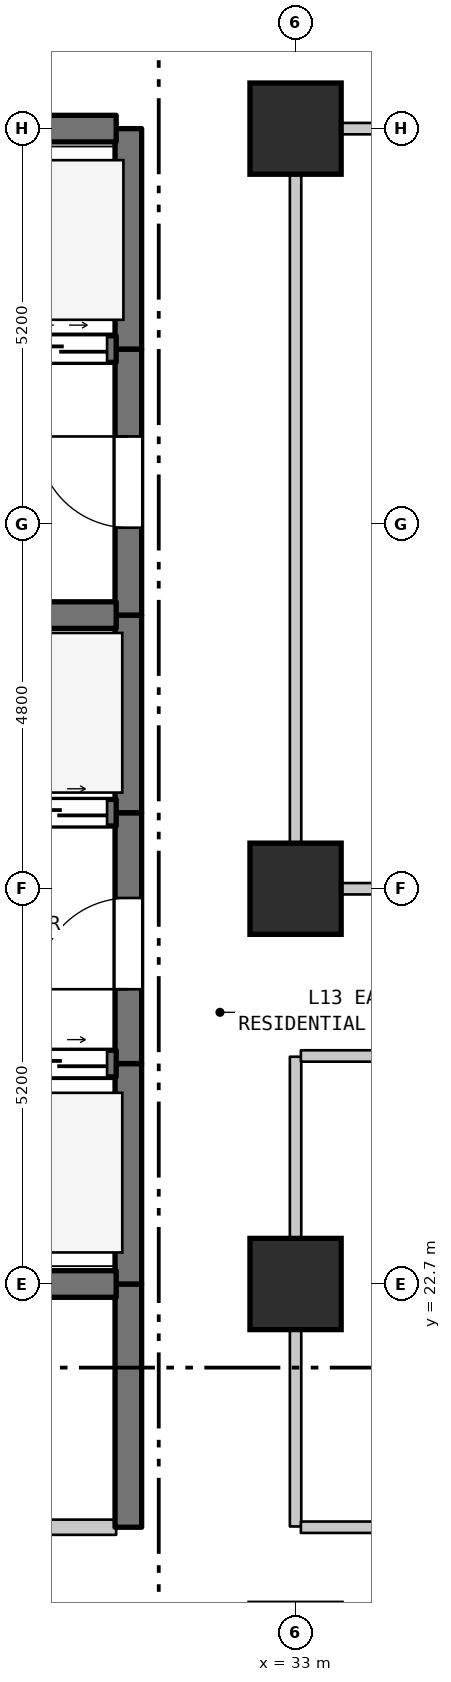
"""IFC4 building model, lengths in metres.
Left out: names, types, materials, properties, quantities, classifications, styles, units other than length and angle.
Written with IfcOpenShell. Run it as: python <this file> out.ifc"""

import sys

from ifc_helpers import new_model, si_unit, direction, frame, frame_2d, origin, origin_2d, place, context, subcontext, project, spatial, rectangle, extrude, element, fill, save


model = new_model("IFC4")
c1 = context("Model", 3, precision=1e-05, world=origin(), true_north=direction((0.0, 1.0)))
c2 = subcontext(c1, "Body", "Model", "MODEL_VIEW")
j1 = project(units=[si_unit("LENGTHUNIT", "METRE"), si_unit("PLANEANGLEUNIT", "RADIAN")], contexts=[c1])
p1 = place(None, origin())
s1 = spatial("IfcSite", under=j1, at=p1, CompositionType="ELEMENT")
p2 = place(p1, origin())
s2 = spatial("IfcBuilding", under=s1, at=p2, CompositionType="ELEMENT")
p3 = place(p2, frame((0.0, 0.0, 57.3)))
s3 = spatial("IfcBuildingStorey", under=s2, at=p3, CompositionType="ELEMENT", Elevation=57.3)
for number, where, z_axis, x_axis in (
    (1, (33.0, 22.7, 0.0), (0.0, 0.0, 1.0), (1.0, 0.0, 0.0)),
    (2, (33.0, 27.9, 0.0), (0.0, 0.0, 1.0), (1.0, 0.0, 0.0)),
    (3, (33.0, 37.9, 0.0), (0.0, 0.0, 1.0), (1.0, 0.0, 0.0)),
):
    element("IfcColumn", number, at=place(p3, frame(where, z_axis=z_axis, x_axis=x_axis)), inside=s3, PredefinedType="COLUMN", context=c2, shape_type="SweptSolid", body=[
        extrude(rectangle(XDim=1.2, YDim=1.2, at=origin_2d()), origin(), (0.0, 0.0, 1.0), 3.7),
    ])
p4 = place(p3, frame((30.8, 19.5, 0.0), z_axis=(0.0, 0.0, 1.0), x_axis=(0.0, 1.0, 0.0)))
e4 = element("IfcWall", 4, at=p4, inside=s3, PredefinedType="SHEAR", context=c2, shape_type="SweptSolid", body=[
    extrude(rectangle(XDim=3.2, YDim=0.35, at=frame_2d((1.6, 0.0))), origin(), (0.0, 0.0, 1.0), 3.28),
])
p5 = place(p3, frame((30.8, 22.7, 0.0), z_axis=(0.0, 0.0, 1.0), x_axis=(0.0, 1.0, 0.0)))
e5 = element("IfcWall", 5, at=p5, inside=s3, PredefinedType="SHEAR", context=c2, shape_type="SweptSolid", body=[
    extrude(rectangle(XDim=2.9, YDim=0.35, at=frame_2d((1.45, 0.0))), origin(), (0.0, 0.0, 1.0), 3.28),
])
p6 = place(p3, frame((30.8, 25.6, 0.0), z_axis=(0.0, 0.0, 1.0), x_axis=(0.0, 1.0, 0.0)))
e6 = element("IfcWall", 6, at=p6, inside=s3, PredefinedType="SHEAR", context=c2, shape_type="SweptSolid", body=[
    extrude(rectangle(XDim=3.3, YDim=0.35, at=frame_2d((1.65, 0.0))), origin(), (0.0, 0.0, 1.0), 3.28),
])
p7 = place(p6, frame((0.978, 0.0, 0.0)))
e7 = element("IfcOpeningElement", 7, at=p7, cuts=e6, PredefinedType="OPENING", context=c2, shape_type="SweptSolid", body=[
    extrude(rectangle(XDim=1.2, YDim=2.2, at=frame_2d((0.6, 1.1))), frame((0.0, 0.185, 0.0), z_axis=(0.0, -1.0, 0.0), x_axis=(1.0, 0.0, 0.0)), (0.0, 0.0, 1.0), 0.37),
])
p8 = place(p3, frame((30.8, 28.9, 0.0), z_axis=(0.0, 0.0, 1.0), x_axis=(0.0, 1.0, 0.0)))
e8 = element("IfcWall", 8, at=p8, inside=s3, PredefinedType="SHEAR", context=c2, shape_type="SweptSolid", body=[
    extrude(rectangle(XDim=2.6, YDim=0.35, at=frame_2d((1.3, 0.0))), origin(), (0.0, 0.0, 1.0), 3.28),
])
p9 = place(p3, frame((30.8, 31.5, 0.0), z_axis=(0.0, 0.0, 1.0), x_axis=(0.0, 1.0, 0.0)))
e9 = element("IfcWall", 9, at=p9, inside=s3, PredefinedType="SHEAR", context=c2, shape_type="SweptSolid", body=[
    extrude(rectangle(XDim=3.5, YDim=0.35, at=frame_2d((1.75, 0.0))), origin(), (0.0, 0.0, 1.0), 3.28),
])
p10 = place(p9, frame((1.15, 0.0, 0.0)))
e10 = element("IfcOpeningElement", 10, at=p10, cuts=e9, PredefinedType="OPENING", context=c2, shape_type="SweptSolid", body=[
    extrude(rectangle(XDim=1.2, YDim=2.2, at=frame_2d((0.6, 1.1))), frame((0.0, 0.185, 0.0), z_axis=(0.0, -1.0, 0.0), x_axis=(1.0, 0.0, 0.0)), (0.0, 0.0, 1.0), 0.37),
])
p11 = place(p3, frame((30.8, 35.0, 0.0), z_axis=(0.0, 0.0, 1.0), x_axis=(0.0, 1.0, 0.0)))
e11 = element("IfcWall", 11, at=p11, inside=s3, PredefinedType="SHEAR", context=c2, shape_type="SweptSolid", body=[
    extrude(rectangle(XDim=2.9, YDim=0.35, at=frame_2d((1.45, 0.0))), origin(), (0.0, 0.0, 1.0), 3.28),
])
p12 = place(p3, frame((33.0, 19.51, 0.0), z_axis=(0.0, 0.0, 1.0), x_axis=(0.0, 1.0, 0.0)))
e12 = element("IfcWall", 12, at=p12, inside=s3, PredefinedType="STANDARD", context=c2, shape_type="SweptSolid", body=[
    extrude(rectangle(XDim=6.18, YDim=0.15, at=frame_2d((3.09, 0.0))), origin(), (0.0, 0.0, 1.0), 2.78),
])
p13 = place(p3, frame((33.0, 27.91, 0.0), z_axis=(0.0, 0.0, 1.0), x_axis=(0.0, 1.0, 0.0)))
e13 = element("IfcWall", 13, at=p13, inside=s3, PredefinedType="STANDARD", context=c2, shape_type="SweptSolid", body=[
    extrude(rectangle(XDim=9.98, YDim=0.15, at=frame_2d((4.99, 0.0))), origin(), (0.0, 0.0, 1.0), 2.78),
])
p14 = place(p3, frame((25.985, 19.5, 0.0), z_axis=(0.0, 0.0, 1.0), x_axis=(1.0, 0.0, 0.0)))
e14 = element("IfcWall", 14, at=p14, inside=s3, PredefinedType="STANDARD", context=c2, shape_type="SweptSolid", body=[
    extrude(rectangle(XDim=4.655, YDim=0.2, at=frame_2d((2.327, 0.0))), origin(), (0.0, 0.0, 1.0), 3.28),
])
p15 = place(p14, frame((1.845, 0.0, 0.0)))
e15 = element("IfcOpeningElement", 15, at=p15, cuts=e14, PredefinedType="OPENING", context=c2, shape_type="SweptSolid", body=[
    extrude(rectangle(XDim=0.9, YDim=2.15, at=frame_2d((0.45, 1.075))), frame((0.0, 0.11, 0.0), z_axis=(0.0, -1.0, 0.0), x_axis=(1.0, 0.0, 0.0)), (0.0, 0.0, 1.0), 0.22),
])
p16 = place(p3, frame((33.07, 19.5, 0.0), z_axis=(0.0, 0.0, 1.0), x_axis=(1.0, 0.0, 0.0)))
e16 = element("IfcWall", 16, at=p16, inside=s3, PredefinedType="STANDARD", context=c2, shape_type="SweptSolid", body=[
    extrude(rectangle(XDim=33.27, YDim=0.15, at=frame_2d((16.635, 0.0))), origin(), (0.0, 0.0, 1.0), 3.28),
])
p17 = place(p16, frame((16.065, 0.0, 0.0)))
e17 = element("IfcOpeningElement", 17, at=p17, cuts=e16, PredefinedType="OPENING", context=c2, shape_type="SweptSolid", body=[
    extrude(rectangle(XDim=1.0, YDim=2.15, at=frame_2d((0.5, 1.075))), frame((0.0, 0.085, 0.0), z_axis=(0.0, -1.0, 0.0), x_axis=(1.0, 0.0, 0.0)), (0.0, 0.0, 1.0), 0.17),
])
p18 = place(p3, frame((27.46, 22.7, 0.0), z_axis=(0.0, 0.0, 1.0), x_axis=(1.0, 0.0, 0.0)))
e18 = element("IfcWall", 18, at=p18, inside=s3, PredefinedType="SHEAR", context=c2, shape_type="SweptSolid", body=[
    extrude(rectangle(XDim=3.18, YDim=0.35, at=frame_2d((1.59, 0.0))), origin(), (0.0, 0.0, 1.0), 3.28),
])
p19 = place(p3, frame((27.46, 25.6, 0.0), z_axis=(0.0, 0.0, 1.0), x_axis=(1.0, 0.0, 0.0)))
e19 = element("IfcWall", 19, at=p19, inside=s3, PredefinedType="SHEAR", context=c2, shape_type="SweptSolid", body=[
    extrude(rectangle(XDim=3.18, YDim=0.35, at=frame_2d((1.59, 0.0))), origin(), (0.0, 0.0, 1.0), 3.28),
])
p20 = place(p19, frame((0.12, 0.0, 0.0)))
e20 = element("IfcOpeningElement", 20, at=p20, cuts=e19, PredefinedType="OPENING", context=c2, shape_type="SweptSolid", body=[
    extrude(rectangle(XDim=1.25, YDim=2.2, at=frame_2d((0.625, 1.1))), frame((0.0, 0.185, 0.0), z_axis=(0.0, -1.0, 0.0), x_axis=(1.0, 0.0, 0.0)), (0.0, 0.0, 1.0), 0.37),
])
p21 = place(p19, frame((1.81, 0.0, 0.0)))
e21 = element("IfcOpeningElement", 21, at=p21, cuts=e19, PredefinedType="OPENING", context=c2, shape_type="SweptSolid", body=[
    extrude(rectangle(XDim=1.25, YDim=2.2, at=frame_2d((0.625, 1.1))), frame((0.0, 0.185, 0.0), z_axis=(0.0, -1.0, 0.0), x_axis=(1.0, 0.0, 0.0)), (0.0, 0.0, 1.0), 0.37),
])
p22 = place(p3, frame((33.07, 25.7, 0.0), z_axis=(0.0, 0.0, 1.0), x_axis=(1.0, 0.0, 0.0)))
e22 = element("IfcWall", 22, at=p22, inside=s3, PredefinedType="STANDARD", context=c2, shape_type="SweptSolid", body=[
    extrude(rectangle(XDim=30.87, YDim=0.15, at=frame_2d((15.435, 0.0))), origin(), (0.0, 0.0, 1.0), 3.28),
])
p23 = place(p3, frame((33.07, 27.9, 0.0), z_axis=(0.0, 0.0, 1.0), x_axis=(1.0, 0.0, 0.0)))
e23 = element("IfcWall", 23, at=p23, inside=s3, PredefinedType="STANDARD", context=c2, shape_type="SweptSolid", body=[
    extrude(rectangle(XDim=30.87, YDim=0.15, at=frame_2d((15.435, 0.0))), origin(), (0.0, 0.0, 1.0), 2.78),
])
p24 = place(p23, frame((14.935, 0.0, 0.0)))
e24 = element("IfcOpeningElement", 24, at=p24, cuts=e23, PredefinedType="OPENING", context=c2, shape_type="SweptSolid", body=[
    extrude(rectangle(XDim=1.0, YDim=2.15, at=frame_2d((0.5, 1.075))), frame((0.0, 0.085, 0.0), z_axis=(0.0, -1.0, 0.0), x_axis=(1.0, 0.0, 0.0)), (0.0, 0.0, 1.0), 0.17),
])
p25 = place(p3, frame((27.46, 28.9, 0.0), z_axis=(0.0, 0.0, 1.0), x_axis=(1.0, 0.0, 0.0)))
e25 = element("IfcWall", 25, at=p25, inside=s3, PredefinedType="SHEAR", context=c2, shape_type="SweptSolid", body=[
    extrude(rectangle(XDim=3.18, YDim=0.35, at=frame_2d((1.59, 0.0))), origin(), (0.0, 0.0, 1.0), 3.28),
])
p26 = place(p25, frame((0.12, 0.0, 0.0)))
e26 = element("IfcOpeningElement", 26, at=p26, cuts=e25, PredefinedType="OPENING", context=c2, shape_type="SweptSolid", body=[
    extrude(rectangle(XDim=1.25, YDim=2.2, at=frame_2d((0.625, 1.1))), frame((0.0, 0.185, 0.0), z_axis=(0.0, -1.0, 0.0), x_axis=(1.0, 0.0, 0.0)), (0.0, 0.0, 1.0), 0.37),
])
p27 = place(p25, frame((1.81, 0.0, 0.0)))
e27 = element("IfcOpeningElement", 27, at=p27, cuts=e25, PredefinedType="OPENING", context=c2, shape_type="SweptSolid", body=[
    extrude(rectangle(XDim=1.25, YDim=2.2, at=frame_2d((0.625, 1.1))), frame((0.0, 0.185, 0.0), z_axis=(0.0, -1.0, 0.0), x_axis=(1.0, 0.0, 0.0)), (0.0, 0.0, 1.0), 0.37),
])
p28 = place(p3, frame((27.46, 31.5, 0.0), z_axis=(0.0, 0.0, 1.0), x_axis=(1.0, 0.0, 0.0)))
e28 = element("IfcWall", 28, at=p28, inside=s3, PredefinedType="SHEAR", context=c2, shape_type="SweptSolid", body=[
    extrude(rectangle(XDim=3.18, YDim=0.35, at=frame_2d((1.59, 0.0))), origin(), (0.0, 0.0, 1.0), 3.28),
])
p29 = place(p3, frame((19.16, 35.0, 0.0), z_axis=(0.0, 0.0, 1.0), x_axis=(1.0, 0.0, 0.0)))
e29 = element("IfcWall", 29, at=p29, inside=s3, PredefinedType="SHEAR", context=c2, shape_type="SweptSolid", body=[
    extrude(rectangle(XDim=11.48, YDim=0.35, at=frame_2d((5.74, 0.0))), origin(), (0.0, 0.0, 1.0), 3.28),
])
p30 = place(p29, frame((0.365, 0.0, 0.0)))
e30 = element("IfcOpeningElement", 30, at=p30, cuts=e29, PredefinedType="OPENING", context=c2, shape_type="SweptSolid", body=[
    extrude(rectangle(XDim=1.35, YDim=2.2, at=frame_2d((0.675, 1.1))), frame((0.0, 0.185, 0.0), z_axis=(0.0, -1.0, 0.0), x_axis=(1.0, 0.0, 0.0)), (0.0, 0.0, 1.0), 0.37),
])
p31 = place(p29, frame((2.765, 0.0, 0.0)))
e31 = element("IfcOpeningElement", 31, at=p31, cuts=e29, PredefinedType="OPENING", context=c2, shape_type="SweptSolid", body=[
    extrude(rectangle(XDim=1.35, YDim=2.2, at=frame_2d((0.675, 1.1))), frame((0.0, 0.185, 0.0), z_axis=(0.0, -1.0, 0.0), x_axis=(1.0, 0.0, 0.0)), (0.0, 0.0, 1.0), 0.37),
])
p32 = place(p29, frame((4.915, 0.0, 0.0)))
e32 = element("IfcOpeningElement", 32, at=p32, cuts=e29, PredefinedType="OPENING", context=c2, shape_type="SweptSolid", body=[
    extrude(rectangle(XDim=1.2, YDim=2.2, at=frame_2d((0.6, 1.1))), frame((0.0, 0.185, 0.0), z_axis=(0.0, -1.0, 0.0), x_axis=(1.0, 0.0, 0.0)), (0.0, 0.0, 1.0), 0.37),
])
p33 = place(p29, frame((6.665, 0.0, 0.0)))
e33 = element("IfcOpeningElement", 33, at=p33, cuts=e29, PredefinedType="OPENING", context=c2, shape_type="SweptSolid", body=[
    extrude(rectangle(XDim=1.2, YDim=2.2, at=frame_2d((0.6, 1.1))), frame((0.0, 0.185, 0.0), z_axis=(0.0, -1.0, 0.0), x_axis=(1.0, 0.0, 0.0)), (0.0, 0.0, 1.0), 0.37),
])
p34 = place(p29, frame((8.415, 0.0, 0.0)))
e34 = element("IfcOpeningElement", 34, at=p34, cuts=e29, PredefinedType="OPENING", context=c2, shape_type="SweptSolid", body=[
    extrude(rectangle(XDim=1.2, YDim=2.2, at=frame_2d((0.6, 1.1))), frame((0.0, 0.185, 0.0), z_axis=(0.0, -1.0, 0.0), x_axis=(1.0, 0.0, 0.0)), (0.0, 0.0, 1.0), 0.37),
])
p35 = place(p29, frame((10.16, 0.0, 0.0)))
e35 = element("IfcOpeningElement", 35, at=p35, cuts=e29, PredefinedType="OPENING", context=c2, shape_type="SweptSolid", body=[
    extrude(rectangle(XDim=1.2, YDim=2.2, at=frame_2d((0.6, 1.1))), frame((0.0, 0.185, 0.0), z_axis=(0.0, -1.0, 0.0), x_axis=(1.0, 0.0, 0.0)), (0.0, 0.0, 1.0), 0.37),
])
p36 = place(p3, frame((19.16, 37.9, 0.0), z_axis=(0.0, 0.0, 1.0), x_axis=(1.0, 0.0, 0.0)))
e36 = element("IfcWall", 36, at=p36, inside=s3, PredefinedType="SHEAR", context=c2, shape_type="SweptSolid", body=[
    extrude(rectangle(XDim=11.48, YDim=0.35, at=frame_2d((5.74, 0.0))), origin(), (0.0, 0.0, 1.0), 3.28),
])
p37 = place(p3, frame((33.07, 37.9, 0.0), z_axis=(0.0, 0.0, 1.0), x_axis=(1.0, 0.0, 0.0)))
e37 = element("IfcWall", 37, at=p37, inside=s3, PredefinedType="STANDARD", context=c2, shape_type="SweptSolid", body=[
    extrude(rectangle(XDim=26.935, YDim=0.15, at=frame_2d((13.467, 0.0))), origin(), (0.0, 0.0, 1.0), 3.28),
])
p38 = place(p7, origin())
e38 = element("IfcDoor", 38, at=p38, inside=s3, OperationType="SINGLE_SWING_LEFT", PredefinedType="DOOR", context=c2, shape_type="SweptSolid", body=[
    extrude(rectangle(XDim=1.2, YDim=2.2, at=frame_2d((0.6, 1.1))), frame((0.0, 0.025, 0.0), z_axis=(0.0, -1.0, 0.0), x_axis=(1.0, 0.0, 0.0)), (0.0, 0.0, 1.0), 0.05),
])
fill(e7, e38)
p39 = place(p10, origin())
e39 = element("IfcDoor", 39, at=p39, inside=s3, OperationType="SINGLE_SWING_RIGHT", PredefinedType="DOOR", context=c2, shape_type="SweptSolid", body=[
    extrude(rectangle(XDim=1.2, YDim=2.2, at=frame_2d((0.6, 1.1))), frame((0.0, 0.025, 0.0), z_axis=(0.0, -1.0, 0.0), x_axis=(1.0, 0.0, 0.0)), (0.0, 0.0, 1.0), 0.05),
])
fill(e10, e39)
p40 = place(p21, origin())
e40 = element("IfcDoor", 40, at=p40, inside=s3, OperationType="DOUBLE_DOOR_SLIDING", PredefinedType="DOOR", context=c2, shape_type="SweptSolid", body=[
    extrude(rectangle(XDim=1.25, YDim=2.2, at=frame_2d((0.625, 1.1))), frame((0.0, 0.025, 0.0), z_axis=(0.0, -1.0, 0.0), x_axis=(1.0, 0.0, 0.0)), (0.0, 0.0, 1.0), 0.05),
])
fill(e21, e40)
p41 = place(p27, origin())
e41 = element("IfcDoor", 41, at=p41, inside=s3, OperationType="DOUBLE_DOOR_SLIDING", PredefinedType="DOOR", context=c2, shape_type="SweptSolid", body=[
    extrude(rectangle(XDim=1.25, YDim=2.2, at=frame_2d((0.625, 1.1))), frame((0.0, 0.025, 0.0), z_axis=(0.0, -1.0, 0.0), x_axis=(1.0, 0.0, 0.0)), (0.0, 0.0, 1.0), 0.05),
])
fill(e27, e41)
p42 = place(p35, origin())
e42 = element("IfcDoor", 42, at=p42, inside=s3, OperationType="DOUBLE_DOOR_SLIDING", PredefinedType="DOOR", context=c2, shape_type="SweptSolid", body=[
    extrude(rectangle(XDim=1.2, YDim=2.2, at=frame_2d((0.6, 1.1))), frame((0.0, 0.025, 0.0), z_axis=(0.0, -1.0, 0.0), x_axis=(1.0, 0.0, 0.0)), (0.0, 0.0, 1.0), 0.05),
])
fill(e35, e42)
save(model, sys.argv[1])
